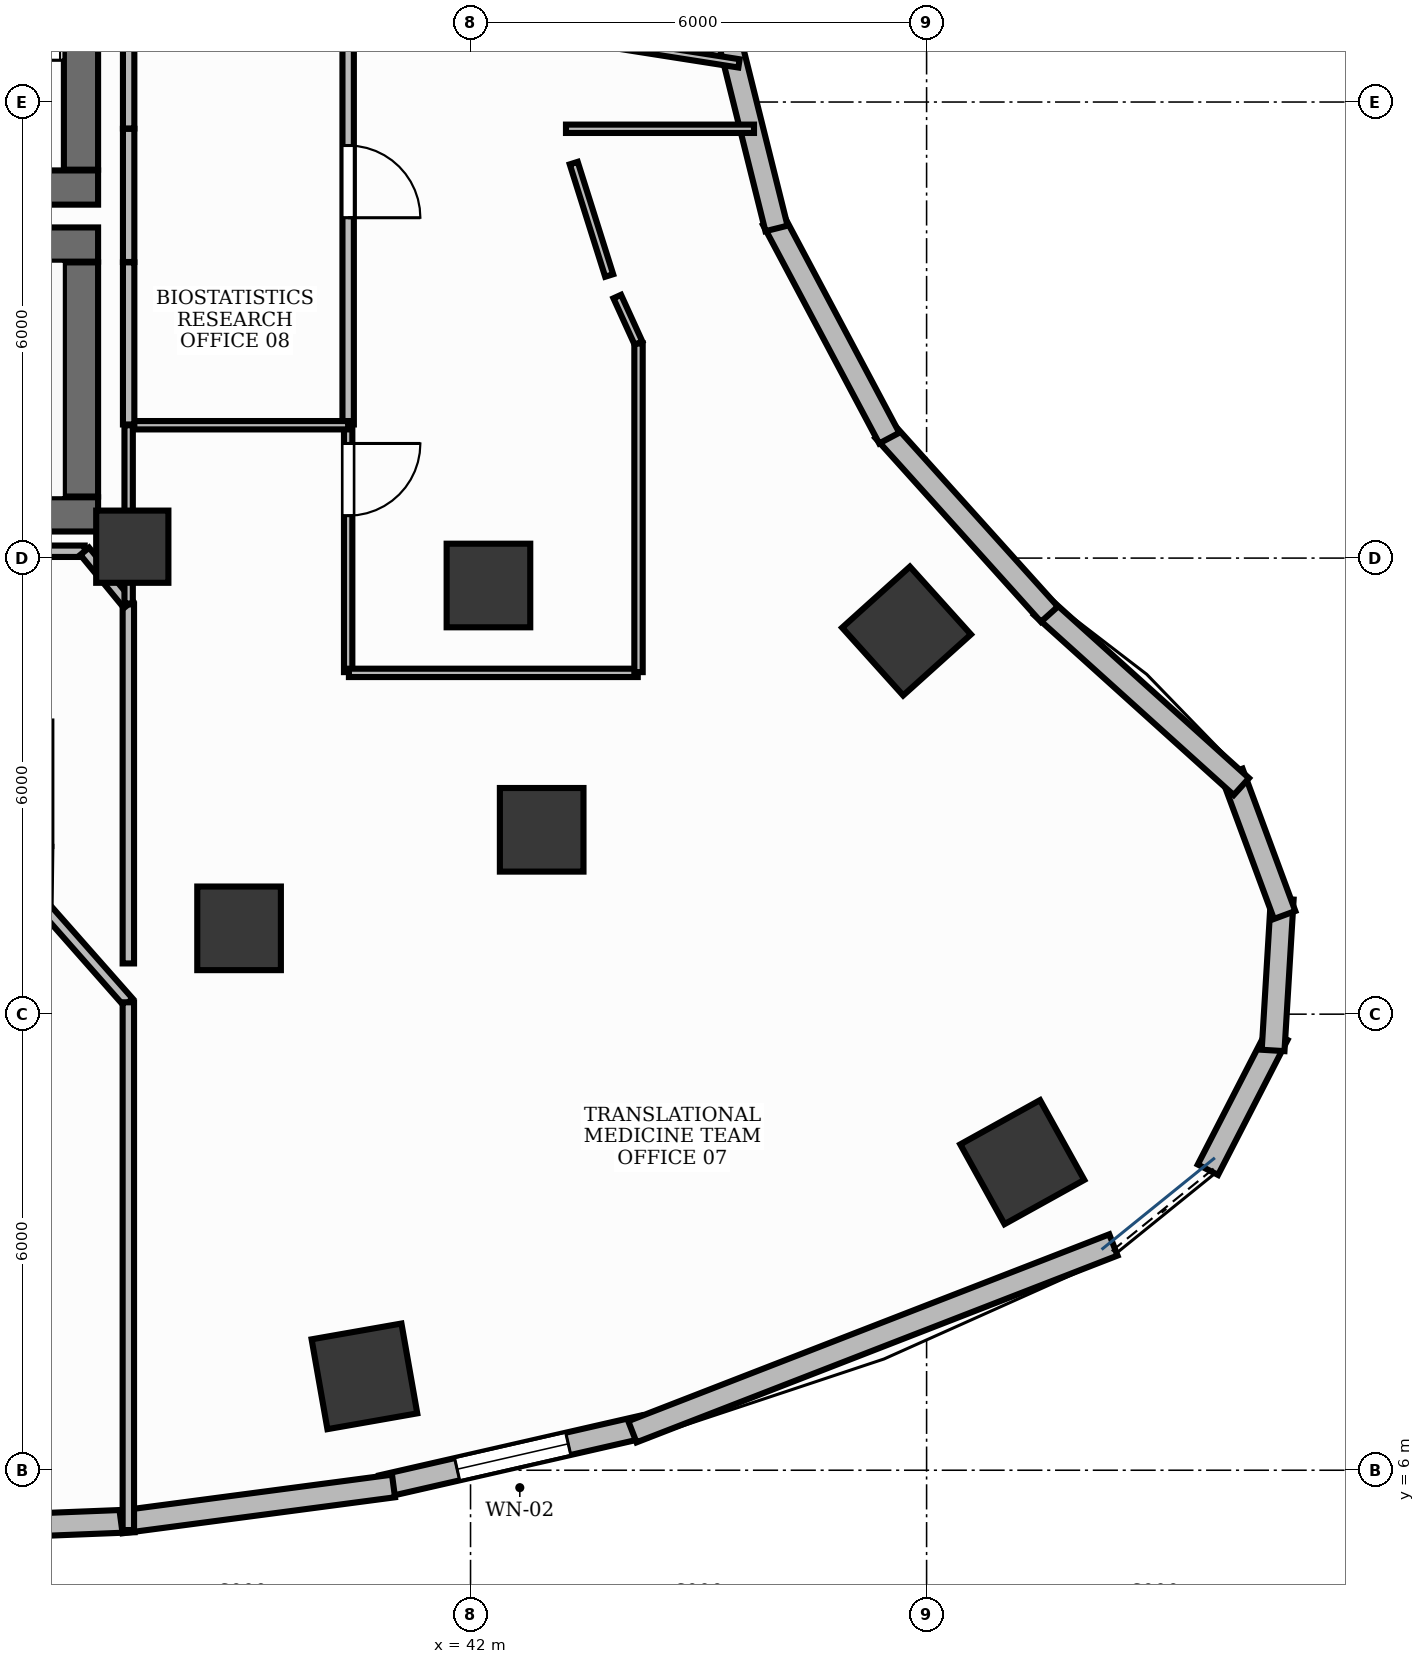
"""IFC4 building model, lengths in metres.
Left out: names, types, materials, properties, quantities, classifications, styles, units other than length and angle.
Written with IfcOpenShell. Run it as: python <this file> out.ifc"""

import sys

from ifc_helpers import new_model, si_unit, direction, frame, frame_2d, origin, origin_2d, place, context, subcontext, project, spatial, rectangle, extrude, element, fill, save


model = new_model("IFC4")
c1 = context("Model", 3, precision=1e-05, world=origin(), true_north=direction((0.0, 1.0)))
c2 = subcontext(c1, "Body", "Model", "MODEL_VIEW")
j1 = project(units=[si_unit("LENGTHUNIT", "METRE"), si_unit("PLANEANGLEUNIT", "RADIAN")], contexts=[c1])
p1 = place(None, origin())
s1 = spatial("IfcSite", under=j1, at=p1, CompositionType="ELEMENT")
p2 = place(p1, origin())
s2 = spatial("IfcBuilding", under=s1, at=p2, CompositionType="ELEMENT")
p3 = place(p2, frame((0.0, 0.0, 115.2)))
s3 = spatial("IfcBuildingStorey", under=s2, at=p3, CompositionType="ELEMENT", Elevation=115.2)
p4 = place(p3, frame((28.852, 18.575, 0.0), z_axis=(0.0, 0.0, 1.0), x_axis=(1.0, 0.0, 0.0)))
e1 = element("IfcWall", 1, at=p4, inside=s3, PredefinedType="SHEAR", context=c2, shape_type="SweptSolid", body=[
    extrude(rectangle(XDim=8.248, YDim=0.45, at=frame_2d((4.124, 0.0))), origin(), (0.0, 0.0, 1.0), 3.9),
])
p5 = place(p3, frame((28.35, 22.125, 0.0), z_axis=(0.0, 0.0, 1.0), x_axis=(1.0, 0.0, 0.0)))
e2 = element("IfcWall", 2, at=p5, inside=s3, PredefinedType="SHEAR", context=c2, shape_type="SweptSolid", body=[
    extrude(rectangle(XDim=8.75, YDim=0.45, at=frame_2d((4.375, 0.0))), origin(), (0.0, 0.0, 1.0), 3.9),
])
p6 = place(p3, frame((36.875, 18.81, 0.0), z_axis=(0.0, 0.0, 1.0), x_axis=(0.0, 1.0, 0.0)))
e3 = element("IfcWall", 3, at=p6, inside=s3, PredefinedType="SHEAR", context=c2, shape_type="SweptSolid", body=[
    extrude(rectangle(XDim=3.08, YDim=0.45, at=frame_2d((1.54, 0.0))), origin(), (0.0, 0.0, 1.0), 3.9),
])
p7 = place(p3, frame((33.1, 22.875, 0.0), z_axis=(0.0, 0.0, 1.0), x_axis=(1.0, 0.0, 0.0)))
e4 = element("IfcWall", 4, at=p7, inside=s3, PredefinedType="SHEAR", context=c2, shape_type="SweptSolid", body=[
    extrude(rectangle(XDim=4.0, YDim=0.45, at=frame_2d((2.0, 0.0))), origin(), (0.0, 0.0, 1.0), 3.9),
])
p8 = place(p3, frame((36.875, 23.11, 0.0), z_axis=(0.0, 0.0, 1.0), x_axis=(0.0, 1.0, 0.0)))
e5 = element("IfcWall", 5, at=p8, inside=s3, PredefinedType="SHEAR", context=c2, shape_type="SweptSolid", body=[
    extrude(rectangle(XDim=7.78, YDim=0.45, at=frame_2d((3.89, 0.0))), origin(), (0.0, 0.0, 1.0), 3.9),
])
p9 = place(p3, frame((37.55, 18.15, -0.0), z_axis=(0.0, 0.0, 1.0), x_axis=(1.0, 0.0, 0.0)))
e6 = element("IfcColumn", 6, at=p9, inside=s3, PredefinedType="PILASTER", context=c2, shape_type="SweptSolid", body=[
    extrude(rectangle(XDim=0.95, YDim=0.95, at=origin_2d()), origin(), (0.0, 0.0, 1.0), 3.901),
])
p10 = place(p3, frame((40.604, 7.235, -0.0), z_axis=(0.0, 0.0, 1.0), x_axis=(0.984868307662, 0.173304404339, 0.0)))
e7 = element("IfcColumn", 7, at=p10, inside=s3, PredefinedType="COLUMN", context=c2, shape_type="SweptSolid", body=[
    extrude(rectangle(XDim=1.2, YDim=1.2, at=origin_2d()), origin(), (0.0, 0.0, 1.0), 3.901),
])
p11 = place(p3, frame((38.955, 13.129, -0.0), z_axis=(0.0, 0.0, 1.0), x_axis=(1.0, 0.0, 0.0)))
e8 = element("IfcColumn", 8, at=p11, inside=s3, PredefinedType="COLUMN", context=c2, shape_type="SweptSolid", body=[
    extrude(rectangle(XDim=1.1, YDim=1.1, at=origin_2d()), origin(), (0.0, 0.0, 1.0), 3.901),
])
p12 = place(p3, frame((49.259, 10.053, -0.0), z_axis=(0.0, 0.0, 1.0), x_axis=(0.874535078577, 0.484962262797, 0.0)))
e9 = element("IfcColumn", 9, at=p12, inside=s3, PredefinedType="COLUMN", context=c2, shape_type="SweptSolid", body=[
    extrude(rectangle(XDim=1.2, YDim=1.2, at=origin_2d()), origin(), (0.0, 0.0, 1.0), 3.901),
])
p13 = place(p3, frame((42.936, 14.425, -0.0), z_axis=(0.0, 0.0, 1.0), x_axis=(1.0, 0.0, 0.0)))
e10 = element("IfcColumn", 10, at=p13, inside=s3, PredefinedType="COLUMN", context=c2, shape_type="SweptSolid", body=[
    extrude(rectangle(XDim=1.1, YDim=1.1, at=origin_2d()), origin(), (0.0, 0.0, 1.0), 3.901),
])
p14 = place(p3, frame((47.736, 17.04, -0.0), z_axis=(0.0, 0.0, 1.0), x_axis=(-0.669130606359, 0.743144825477, 0.0)))
e11 = element("IfcColumn", 11, at=p14, inside=s3, PredefinedType="COLUMN", context=c2, shape_type="SweptSolid", body=[
    extrude(rectangle(XDim=1.2, YDim=1.2, at=origin_2d()), origin(), (0.0, 0.0, 1.0), 3.901),
])
p15 = place(p3, frame((42.236, 17.639, -0.0), z_axis=(0.0, 0.0, 1.0), x_axis=(1.0, 0.0, 0.0)))
e12 = element("IfcColumn", 12, at=p15, inside=s3, PredefinedType="COLUMN", context=c2, shape_type="SweptSolid", body=[
    extrude(rectangle(XDim=1.1, YDim=1.1, at=origin_2d()), origin(), (0.0, 0.0, 1.0), 3.901),
])
p16 = place(p3, frame((40.831, 5.786, 0.0), z_axis=(0.0, 0.0, 1.0), x_axis=(0.974836214244, 0.222922307989, 0.0)))
e13 = element("IfcWall", 13, at=p16, inside=s3, PredefinedType="STANDARD", context=c2, shape_type="SweptSolid", body=[
    extrude(rectangle(XDim=3.535, YDim=0.3, at=frame_2d((1.768, 0.0))), origin(), (0.0, 0.0, 1.0), 3.9),
])
p17 = place(p16, frame((1.018, 0.0, 0.95)))
e14 = element("IfcOpeningElement", 14, at=p17, cuts=e13, PredefinedType="OPENING", context=c2, shape_type="SweptSolid", body=[
    extrude(rectangle(XDim=1.5, YDim=1.8, at=frame_2d((0.75, 0.9))), frame((0.0, 0.165, 0.0), z_axis=(0.0, -1.0, 0.0), x_axis=(1.0, 0.0, 0.0)), (0.0, 0.0, 1.0), 0.33),
])
p18 = place(p3, frame((33.942, 5.189, 0.0), z_axis=(0.0, 0.0, 1.0), x_axis=(0.999212076676, 0.039689114679, 0.0)))
e15 = element("IfcWall", 15, at=p18, inside=s3, PredefinedType="STANDARD", context=c2, shape_type="SweptSolid", body=[
    extrude(rectangle(XDim=3.635, YDim=0.3, at=frame_2d((1.818, 0.0))), origin(), (0.0, 0.0, 1.0), 3.9),
])
p19 = place(p3, frame((37.402, 5.319, 0.0), z_axis=(0.0, 0.0, 1.0), x_axis=(0.991372969521, 0.131071107816, 0.0)))
e16 = element("IfcWall", 16, at=p19, inside=s3, PredefinedType="STANDARD", context=c2, shape_type="SweptSolid", body=[
    extrude(rectangle(XDim=3.615, YDim=0.3, at=frame_2d((1.808, 0.0))), origin(), (0.0, 0.0, 1.0), 3.9),
])
p20 = place(p3, frame((44.129, 6.506, 0.0), z_axis=(0.0, 0.0, 1.0), x_axis=(0.932179361253, 0.36199673818, 0.0)))
e17 = element("IfcWall", 17, at=p20, inside=s3, PredefinedType="STANDARD", context=c2, shape_type="SweptSolid", body=[
    extrude(rectangle(XDim=6.789, YDim=0.3, at=frame_2d((3.395, 0.0))), origin(), (0.0, 0.0, 1.0), 3.9),
])
for number, where, z_axis, x_axis in (
    (18, (51.701, 9.953, 0.0), (0.0, 0.0, 1.0), (0.458, 0.889, 0.0)),
    (19, (52.559, 11.523, 0.0), (0.0, 0.0, 1.0), (0.06, 0.998, 0.0)),
):
    element("IfcWall", number, at=place(p3, frame(where, z_axis=z_axis, x_axis=x_axis)), inside=s3, PredefinedType="STANDARD", context=c2, shape_type="SweptSolid", body=[
        extrude(rectangle(XDim=1.998, YDim=0.3, at=frame_2d((0.999, 0.0))), origin(), (0.0, 0.0, 1.0), 3.9),
    ])
p21 = place(p3, frame((52.71, 13.305, 0.0), z_axis=(0.0, 0.0, 1.0), x_axis=(-0.347370087337, 0.937728117539, 0.0)))
e20 = element("IfcWall", 20, at=p21, inside=s3, PredefinedType="STANDARD", context=c2, shape_type="SweptSolid", body=[
    extrude(rectangle(XDim=1.997, YDim=0.3, at=frame_2d((0.999, 0.0))), origin(), (0.0, 0.0, 1.0), 3.9),
])
p22 = place(p3, frame((52.141, 14.994, 0.0), z_axis=(0.0, 0.0, 1.0), x_axis=(-0.74255963233, 0.669779958221, 0.0)))
e21 = element("IfcWall", 21, at=p22, inside=s3, PredefinedType="STANDARD", context=c2, shape_type="SweptSolid", body=[
    extrude(rectangle(XDim=3.539, YDim=0.3, at=frame_2d((1.77, 0.0))), origin(), (0.0, 0.0, 1.0), 3.9),
])
p23 = place(p3, frame((49.616, 17.262, 0.0), z_axis=(0.0, 0.0, 1.0), x_axis=(-0.669167727967, 0.743111399353, 0.0)))
e22 = element("IfcWall", 22, at=p23, inside=s3, PredefinedType="STANDARD", context=c2, shape_type="SweptSolid", body=[
    extrude(rectangle(XDim=3.255, YDim=0.3, at=frame_2d((1.628, 0.0))), origin(), (0.0, 0.0, 1.0), 3.9),
])
p24 = place(p3, frame((47.509, 19.579, 0.0), z_axis=(0.0, 0.0, 1.0), x_axis=(-0.469451284634, 0.882958374645, 0.0)))
e23 = element("IfcWall", 23, at=p24, inside=s3, PredefinedType="STANDARD", context=c2, shape_type="SweptSolid", body=[
    extrude(rectangle(XDim=3.256, YDim=0.3, at=frame_2d((1.628, 0.0))), origin(), (0.0, 0.0, 1.0), 3.9),
])
p25 = place(p3, frame((46.025, 22.337, 0.0), z_axis=(0.0, 0.0, 1.0), x_axis=(-0.241900409149, 0.970301083197, 0.0)))
e24 = element("IfcWall", 24, at=p25, inside=s3, PredefinedType="STANDARD", context=c2, shape_type="SweptSolid", body=[
    extrude(rectangle(XDim=3.256, YDim=0.3, at=frame_2d((1.628, 0.0))), origin(), (0.0, 0.0, 1.0), 3.9),
])
p26 = place(p3, frame((40.39, 19.748, 0.0), z_axis=(0.0, 0.0, 1.0), x_axis=(0.0, -1.0, 0.0)))
e25 = element("IfcWall", 25, at=p26, inside=s3, PredefinedType="MOVABLE", context=c2, shape_type="SweptSolid", body=[
    extrude(rectangle(XDim=3.248, YDim=0.11, at=frame_2d((1.624, 0.0))), origin(), (0.0, 0.0, 1.0), 2.91),
])
p27 = place(p26, frame((0.24, 0.0, 0.0)))
e26 = element("IfcOpeningElement", 26, at=p27, cuts=e25, PredefinedType="OPENING", context=c2, shape_type="SweptSolid", body=[
    extrude(rectangle(XDim=0.95, YDim=2.15, at=frame_2d((0.475, 1.075))), frame((0.0, 0.07, 0.0), z_axis=(0.0, -1.0, 0.0), x_axis=(1.0, 0.0, 0.0)), (0.0, 0.0, 1.0), 0.14),
])
p28 = place(p3, frame((40.39, 25.31, 0.0), z_axis=(0.0, 0.0, 1.0), x_axis=(0.0, -1.0, 0.0)))
e27 = element("IfcWall", 27, at=p28, inside=s3, PredefinedType="PARTITIONING", context=c2, shape_type="SweptSolid", body=[
    extrude(rectangle(XDim=5.552, YDim=0.15, at=frame_2d((2.776, 0.0))), origin(), (0.0, 0.0, 1.0), 2.91),
])
p29 = place(p28, frame((1.882, 0.0, 0.0)))
e28 = element("IfcOpeningElement", 28, at=p29, cuts=e27, PredefinedType="OPENING", context=c2, shape_type="SweptSolid", body=[
    extrude(rectangle(XDim=0.95, YDim=2.15, at=frame_2d((0.475, 1.075))), frame((0.0, 0.09, 0.0), z_axis=(0.0, -1.0, 0.0), x_axis=(1.0, 0.0, 0.0)), (0.0, 0.0, 1.0), 0.18),
])
p30 = place(p3, frame((36.4, 13.4, 0.0), z_axis=(0.0, 0.0, 1.0), x_axis=(0.661894141329, -0.74959732235, 0.0)))
e29 = element("IfcWall", 29, at=p30, inside=s3, PredefinedType="PARTITIONING", context=c2, shape_type="SweptSolid", body=[
    extrude(rectangle(XDim=1.659, YDim=0.15, at=frame_2d((0.83, 0.0))), origin(), (0.0, 0.0, 1.0), 2.91),
])
p31 = place(p3, frame((37.498, 12.156, 0.0), z_axis=(0.0, 0.0, 1.0), x_axis=(0.0, -1.0, 0.0)))
e30 = element("IfcWall", 30, at=p31, inside=s3, PredefinedType="PARTITIONING", context=c2, shape_type="SweptSolid", body=[
    extrude(rectangle(XDim=6.943, YDim=0.15, at=frame_2d((3.472, 0.0))), origin(), (0.0, 0.0, 1.0), 2.91),
])
p32 = place(p3, frame((37.498, 17.391, 0.0), z_axis=(0.0, 0.0, 1.0), x_axis=(0.0, -1.0, 0.0)))
e31 = element("IfcWall", 31, at=p32, inside=s3, PredefinedType="PARTITIONING", context=c2, shape_type="SweptSolid", body=[
    extrude(rectangle(XDim=4.723, YDim=0.15, at=frame_2d((2.362, 0.0))), origin(), (0.0, 0.0, 1.0), 2.91),
])
p33 = place(p3, frame((33.46, 18.09, 0.0), z_axis=(0.0, 0.0, 1.0), x_axis=(1.0, 0.0, 0.0)))
e32 = element("IfcWall", 32, at=p33, inside=s3, PredefinedType="PARTITIONING", context=c2, shape_type="SweptSolid", body=[
    extrude(rectangle(XDim=3.464, YDim=0.15, at=frame_2d((1.732, 0.0))), origin(), (0.0, 0.0, 1.0), 2.91),
])
p34 = place(p3, frame((36.924, 18.09, 0.0), z_axis=(0.0, 0.0, 1.0), x_axis=(0.634618530508, -0.772825543532, 0.0)))
e33 = element("IfcWall", 33, at=p34, inside=s3, PredefinedType="PARTITIONING", context=c2, shape_type="SweptSolid", body=[
    extrude(rectangle(XDim=0.905, YDim=0.15, at=frame_2d((0.452, 0.0))), origin(), (0.0, 0.0, 1.0), 2.91),
])
p35 = place(p3, frame((37.502, 19.748, 0.0), z_axis=(0.0, 0.0, 1.0), x_axis=(1.0, 0.0, 0.0)))
e34 = element("IfcWall", 34, at=p35, inside=s3, PredefinedType="MOVABLE", context=c2, shape_type="SweptSolid", body=[
    extrude(rectangle(XDim=2.888, YDim=0.11, at=frame_2d((1.444, 0.0))), origin(), (0.0, 0.0, 1.0), 2.91),
])
p36 = place(p3, frame((40.4, 16.49, 0.0), z_axis=(0.0, 0.0, 1.0), x_axis=(1.0, 0.0, 0.0)))
e35 = element("IfcWall", 35, at=p36, inside=s3, PredefinedType="MOVABLE", context=c2, shape_type="SweptSolid", body=[
    extrude(rectangle(XDim=3.8, YDim=0.11, at=frame_2d((1.9, 0.0))), origin(), (0.0, 0.0, 1.0), 2.91),
])
p37 = place(p3, frame((44.21, 16.5, 0.0), z_axis=(0.0, 0.0, 1.0), x_axis=(0.0, 1.0, 0.0)))
e36 = element("IfcWall", 36, at=p37, inside=s3, PredefinedType="MOVABLE", context=c2, shape_type="SweptSolid", body=[
    extrude(rectangle(XDim=4.325, YDim=0.11, at=frame_2d((2.163, 0.0))), origin(), (0.0, 0.0, 1.0), 2.91),
])
p38 = place(p3, frame((44.209, 20.829, 0.0), z_axis=(0.0, 0.0, 1.0), x_axis=(-0.414377467152, 0.910105111905, 0.0)))
e37 = element("IfcWall", 37, at=p38, inside=s3, PredefinedType="MOVABLE", context=c2, shape_type="SweptSolid", body=[
    extrude(rectangle(XDim=0.672, YDim=0.11, at=frame_2d((0.336, 0.0))), origin(), (0.0, 0.0, 1.0), 2.91),
])
p39 = place(p3, frame((43.824, 21.718, 0.0), z_axis=(0.0, 0.0, 1.0), x_axis=(-0.300641414783, 0.953737248783, 0.0)))
e38 = element("IfcWall", 38, at=p39, inside=s3, PredefinedType="MOVABLE", context=c2, shape_type="SweptSolid", body=[
    extrude(rectangle(XDim=1.55, YDim=0.11, at=frame_2d((0.775, 0.0))), origin(), (0.0, 0.0, 1.0), 2.91),
])
p40 = place(p3, frame((43.256, 23.648, 0.0), z_axis=(0.0, 0.0, 1.0), x_axis=(1.0, 0.0, 0.0)))
e39 = element("IfcWall", 39, at=p40, inside=s3, PredefinedType="MOVABLE", context=c2, shape_type="SweptSolid", body=[
    extrude(rectangle(XDim=2.474, YDim=0.11, at=frame_2d((1.237, 0.0))), origin(), (0.0, 0.0, 1.0), 2.91),
])
p41 = place(p3, frame((37.502, 17.402, 0.0), z_axis=(0.0, 0.0, 1.0), x_axis=(0.0, 1.0, 0.0)))
e40 = element("IfcWall", 40, at=p41, inside=s3, PredefinedType="MOVABLE", context=c2, shape_type="SweptSolid", body=[
    extrude(rectangle(XDim=2.346, YDim=0.11, at=frame_2d((1.173, 0.0))), origin(), (0.0, 0.0, 1.0), 2.91),
])
p42 = place(p3, frame((37.502, 21.896, 0.0), z_axis=(0.0, 0.0, 1.0), x_axis=(0.0, 1.0, 0.0)))
e41 = element("IfcWall", 41, at=p42, inside=s3, PredefinedType="PARTITIONING", context=c2, shape_type="SweptSolid", body=[
    extrude(rectangle(XDim=1.752, YDim=0.15, at=frame_2d((0.876, 0.0))), origin(), (0.0, 0.0, 1.0), 2.91),
])
p43 = place(p3, frame((37.502, 23.652, 0.0), z_axis=(0.0, 0.0, 1.0), x_axis=(0.0, 1.0, 0.0)))
e42 = element("IfcWall", 42, at=p43, inside=s3, PredefinedType="PARTITIONING", context=c2, shape_type="SweptSolid", body=[
    extrude(rectangle(XDim=1.738, YDim=0.15, at=frame_2d((0.869, 0.0))), origin(), (0.0, 0.0, 1.0), 2.91),
])
p44 = place(p3, frame((37.502, 19.758, 0.0), z_axis=(0.0, 0.0, 1.0), x_axis=(0.0, 1.0, 0.0)))
e43 = element("IfcWall", 43, at=p44, inside=s3, PredefinedType="PARTITIONING", context=c2, shape_type="SweptSolid", body=[
    extrude(rectangle(XDim=2.132, YDim=0.15, at=frame_2d((1.066, 0.0))), origin(), (0.0, 0.0, 1.0), 2.91),
])
p45 = place(p3, frame((45.532, 24.508, 0.0), z_axis=(0.0, 0.0, 1.0), x_axis=(-0.987957888296, 0.154723013653, 0.0)))
e44 = element("IfcWall", 44, at=p45, inside=s3, PredefinedType="MOVABLE", context=c2, shape_type="SweptSolid", body=[
    extrude(rectangle(XDim=2.539, YDim=0.11, at=frame_2d((1.27, 0.0))), origin(), (0.0, 0.0, 1.0), 2.91),
])
p46 = place(p17, origin())
e45 = element("IfcWindow", 45, at=p46, inside=s3, PartitioningType="DOUBLE_PANEL_VERTICAL", PredefinedType="WINDOW", context=c2, shape_type="SweptSolid", body=[
    extrude(rectangle(XDim=1.5, YDim=1.8, at=frame_2d((0.75, 0.9))), frame((0.0, 0.03, 0.0), z_axis=(0.0, -1.0, 0.0), x_axis=(1.0, 0.0, 0.0)), (0.0, 0.0, 1.0), 0.06),
])
fill(e14, e45)
p47 = place(p27, origin())
e46 = element("IfcDoor", 46, at=p47, inside=s3, OperationType="SINGLE_SWING_LEFT", PredefinedType="DOOR", context=c2, shape_type="SweptSolid", body=[
    extrude(rectangle(XDim=0.95, YDim=2.15, at=frame_2d((0.475, 1.075))), frame((0.0, 0.025, 0.0), z_axis=(0.0, -1.0, 0.0), x_axis=(1.0, 0.0, 0.0)), (0.0, 0.0, 1.0), 0.05),
])
fill(e26, e46)
p48 = place(p29, origin())
e47 = element("IfcDoor", 47, at=p48, inside=s3, OperationType="SINGLE_SWING_RIGHT", PredefinedType="DOOR", context=c2, shape_type="SweptSolid", body=[
    extrude(rectangle(XDim=0.95, YDim=2.15, at=frame_2d((0.475, 1.075))), frame((0.0, 0.025, 0.0), z_axis=(0.0, -1.0, 0.0), x_axis=(1.0, 0.0, 0.0)), (0.0, 0.0, 1.0), 0.05),
])
fill(e28, e47)
save(model, sys.argv[1])
